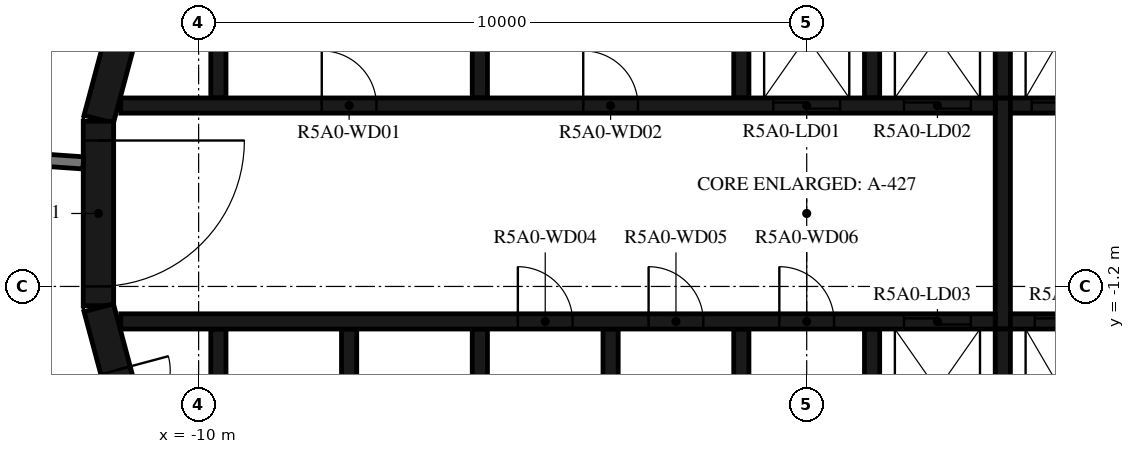
"""IFC4 building model, lengths in metres.
Left out: names, types, materials, properties, quantities, classifications, styles, units other than length and angle.
Written with IfcOpenShell. Run it as: python <this file> out.ifc"""

import sys

from ifc_helpers import new_model, si_unit, direction, frame, frame_2d, origin, place, context, subcontext, project, spatial, polyline, rectangle, outline, extrude, element, fill, save


model = new_model("IFC4")
c1 = context("Model", 3, precision=1e-05, world=origin(), true_north=direction((0.0, 1.0)))
c2 = subcontext(c1, "Body", "Model", "MODEL_VIEW")
j1 = project(units=[si_unit("LENGTHUNIT", "METRE"), si_unit("PLANEANGLEUNIT", "RADIAN")], contexts=[c1])
p1 = place(None, origin())
s1 = spatial("IfcSite", under=j1, at=p1, CompositionType="ELEMENT")
p2 = place(p1, origin())
s2 = spatial("IfcBuilding", under=s1, at=p2, CompositionType="ELEMENT")
p3 = place(p2, frame((0.0, 0.0, 195.4)))
s3 = spatial("IfcBuildingStorey", under=s2, at=p3, CompositionType="ELEMENT", Elevation=195.4)
p4 = place(p3, frame((-10.858, 4.479, 0.0), z_axis=(0.0, 0.0, 1.0), x_axis=(-0.258734743916, -0.965948410781, 0.0)))
e1 = element("IfcWall", 1, at=p4, inside=s3, PredefinedType="SHEAR", context=c2, shape_type="SweptSolid", body=[
    extrude(rectangle(XDim=3.033, YDim=0.5, at=frame_2d((1.516, 0.0))), origin(), (0.0, 0.0, 1.0), 3.12),
])
p5 = place(p3, frame((-11.647, 1.516, 0.0), z_axis=(0.0, 0.0, 1.0), x_axis=(0.0, -1.0, 0.0)))
e2 = element("IfcWall", 2, at=p5, inside=s3, PredefinedType="SHEAR", context=c2, shape_type="SweptSolid", body=[
    extrude(rectangle(XDim=3.033, YDim=0.5, at=frame_2d((1.516, 0.0))), origin(), (0.0, 0.0, 1.0), 3.12),
])
p6 = place(p5, frame((0.316, 0.0, 0.0)))
e3 = element("IfcOpeningElement", 3, at=p6, cuts=e2, PredefinedType="OPENING", context=c2, shape_type="SweptSolid", body=[
    extrude(rectangle(XDim=2.4, YDim=2.1, at=frame_2d((1.2, 1.05))), frame((0.0, 0.26, 0.0), z_axis=(0.0, -1.0, 0.0), x_axis=(1.0, 0.0, 0.0)), (0.0, 0.0, 1.0), 0.52),
])
p7 = place(p3, frame((-11.643, -1.55, 0.0), z_axis=(0.0, 0.0, 1.0), x_axis=(0.258734743916, -0.965948410781, 0.0)))
e4 = element("IfcWall", 4, at=p7, inside=s3, PredefinedType="SHEAR", context=c2, shape_type="SweptSolid", body=[
    extrude(rectangle(XDim=3.033, YDim=0.5, at=frame_2d((1.516, 0.0))), origin(), (0.0, 0.0, 1.0), 3.12),
])
p8 = place(p7, frame((1.066, 0.0, 0.0)))
e5 = element("IfcOpeningElement", 5, at=p8, cuts=e4, PredefinedType="OPENING", context=c2, shape_type="SweptSolid", body=[
    extrude(rectangle(XDim=0.9, YDim=2.1, at=frame_2d((0.45, 1.05))), frame((0.0, 0.26, 0.0), z_axis=(0.0, -1.0, 0.0), x_axis=(1.0, 0.0, 0.0)), (0.0, 0.0, 1.0), 0.52),
])
p9 = place(p3, origin())
e6 = element("IfcWall", 6, at=p9, inside=s3, PredefinedType="SHEAR", context=c2, shape_type="SweptSolid", body=[
    extrude(outline(polyline([(-9.55, 4.8), (-5.5, 4.8), (-5.5, 1.9), (-5.25, 1.9), (-5.25, 4.8), (-1.2, 4.8), (-1.2, 1.9), (-0.95, 1.9), (-0.95, 4.8), (0.95, 4.8), (0.95, 1.9), (1.2, 1.9), (1.2, 4.8), (3.1, 4.8), (3.1, 1.9), (3.35, 1.9), (3.35, 4.8), (5.25, 4.8), (5.25, 1.9), (5.5, 1.9), (5.5, 4.8), (7.4, 4.8), (7.4, 1.9), (7.65, 1.9), (7.65, 4.8), (9.55, 4.8), (9.55, 1.9), (9.8, 1.9), (9.8, 4.8), (9.8, 5.05), (-9.8, 5.05), (-9.8, 4.8), (-9.8, 1.9), (-9.55, 1.9), (-9.55, 4.8)])), origin(), (0.0, 0.0, 1.0), 3.12),
])
p10 = place(p3, origin())
e7 = element("IfcWall", 7, at=p10, inside=s3, PredefinedType="SHEAR", context=c2, shape_type="SweptSolid", body=[
    extrude(outline(polyline([(9.8, -5.05), (9.8, -4.8), (9.8, -1.9), (9.55, -1.9), (9.55, -4.8), (7.65, -4.8), (7.65, -1.9), (7.4, -1.9), (7.4, -4.8), (5.5, -4.8), (5.5, -1.9), (5.25, -1.9), (5.25, -4.8), (3.35, -4.8), (3.35, -1.9), (3.1, -1.9), (3.1, -4.8), (1.2, -4.8), (1.2, -1.9), (0.95, -1.9), (0.95, -4.8), (-0.95, -4.8), (-0.95, -1.9), (-1.2, -1.9), (-1.2, -4.8), (-3.1, -4.8), (-3.1, -1.9), (-3.35, -1.9), (-3.35, -4.8), (-5.25, -4.8), (-5.25, -1.9), (-5.5, -1.9), (-5.5, -4.8), (-7.4, -4.8), (-7.4, -1.9), (-7.65, -1.9), (-7.65, -4.8), (-9.55, -4.8), (-9.55, -1.9), (-9.8, -1.9), (-9.8, -4.8), (-9.8, -5.05), (9.8, -5.05)])), origin(), (0.0, 0.0, 1.0), 3.12),
])
p11 = place(p3, frame((-11.28, 1.775, 0.0), z_axis=(0.0, 0.0, 1.0), x_axis=(1.0, 0.0, 0.0)))
e8 = element("IfcWall", 8, at=p11, inside=s3, PredefinedType="SHEAR", context=c2, shape_type="SweptSolid", body=[
    extrude(rectangle(XDim=14.38, YDim=0.25, at=frame_2d((7.19, 0.0))), origin(), (0.0, 0.0, 1.0), 3.12),
])
p12 = place(p11, frame((10.73, 0.0, 0.0)))
e9 = element("IfcOpeningElement", 9, at=p12, cuts=e8, PredefinedType="OPENING", context=c2, shape_type="SweptSolid", body=[
    extrude(rectangle(XDim=1.1, YDim=2.1, at=frame_2d((0.55, 1.05))), frame((0.0, 0.135, 0.0), z_axis=(0.0, -1.0, 0.0), x_axis=(1.0, 0.0, 0.0)), (0.0, 0.0, 1.0), 0.27),
])
p13 = place(p11, frame((12.88, 0.0, 0.0)))
e10 = element("IfcOpeningElement", 10, at=p13, cuts=e8, PredefinedType="OPENING", context=c2, shape_type="SweptSolid", body=[
    extrude(rectangle(XDim=1.1, YDim=2.1, at=frame_2d((0.55, 1.05))), frame((0.0, 0.135, 0.0), z_axis=(0.0, -1.0, 0.0), x_axis=(1.0, 0.0, 0.0)), (0.0, 0.0, 1.0), 0.27),
])
p14 = place(p11, frame((3.305, 0.0, 0.0)))
e11 = element("IfcOpeningElement", 11, at=p14, cuts=e8, PredefinedType="OPENING", context=c2, shape_type="SweptSolid", body=[
    extrude(rectangle(XDim=0.9, YDim=2.1, at=frame_2d((0.45, 1.05))), frame((0.0, 0.135, 0.0), z_axis=(0.0, -1.0, 0.0), x_axis=(1.0, 0.0, 0.0)), (0.0, 0.0, 1.0), 0.27),
])
p15 = place(p11, frame((7.605, 0.0, 0.0)))
e12 = element("IfcOpeningElement", 12, at=p15, cuts=e8, PredefinedType="OPENING", context=c2, shape_type="SweptSolid", body=[
    extrude(rectangle(XDim=0.9, YDim=2.1, at=frame_2d((0.45, 1.05))), frame((0.0, 0.135, 0.0), z_axis=(0.0, -1.0, 0.0), x_axis=(1.0, 0.0, 0.0)), (0.0, 0.0, 1.0), 0.27),
])
p16 = place(p3, frame((3.35, 1.775, 0.0), z_axis=(0.0, 0.0, 1.0), x_axis=(1.0, 0.0, 0.0)))
e13 = element("IfcWall", 13, at=p16, inside=s3, PredefinedType="SHEAR", context=c2, shape_type="SweptSolid", body=[
    extrude(rectangle(XDim=7.93, YDim=0.25, at=frame_2d((3.965, 0.0))), origin(), (0.0, 0.0, 1.0), 3.12),
])
p17 = place(p16, frame((0.35, 0.0, 0.0)))
e14 = element("IfcOpeningElement", 14, at=p17, cuts=e13, PredefinedType="OPENING", context=c2, shape_type="SweptSolid", body=[
    extrude(rectangle(XDim=1.2, YDim=2.4, at=frame_2d((0.6, 1.2))), frame((0.0, 0.135, 0.0), z_axis=(0.0, -1.0, 0.0), x_axis=(1.0, 0.0, 0.0)), (0.0, 0.0, 1.0), 0.27),
])
p18 = place(p16, frame((2.5, 0.0, 0.0)))
e15 = element("IfcOpeningElement", 15, at=p18, cuts=e13, PredefinedType="OPENING", context=c2, shape_type="SweptSolid", body=[
    extrude(rectangle(XDim=1.2, YDim=2.4, at=frame_2d((0.6, 1.2))), frame((0.0, 0.135, 0.0), z_axis=(0.0, -1.0, 0.0), x_axis=(1.0, 0.0, 0.0)), (0.0, 0.0, 1.0), 0.27),
])
p19 = place(p16, frame((4.8, 0.0, 0.0)))
e16 = element("IfcOpeningElement", 16, at=p19, cuts=e13, PredefinedType="OPENING", context=c2, shape_type="SweptSolid", body=[
    extrude(rectangle(XDim=0.9, YDim=2.1, at=frame_2d((0.45, 1.05))), frame((0.0, 0.135, 0.0), z_axis=(0.0, -1.0, 0.0), x_axis=(1.0, 0.0, 0.0)), (0.0, 0.0, 1.0), 0.27),
])
p20 = place(p3, frame((-11.28, -1.775, 0.0), z_axis=(0.0, 0.0, 1.0), x_axis=(1.0, 0.0, 0.0)))
e17 = element("IfcWall", 17, at=p20, inside=s3, PredefinedType="SHEAR", context=c2, shape_type="SweptSolid", body=[
    extrude(rectangle(XDim=14.38, YDim=0.25, at=frame_2d((7.19, 0.0))), origin(), (0.0, 0.0, 1.0), 3.12),
])
p21 = place(p20, frame((12.88, 0.0, 0.0)))
e18 = element("IfcOpeningElement", 18, at=p21, cuts=e17, PredefinedType="OPENING", context=c2, shape_type="SweptSolid", body=[
    extrude(rectangle(XDim=1.1, YDim=2.1, at=frame_2d((0.55, 1.05))), frame((0.0, 0.135, 0.0), z_axis=(0.0, -1.0, 0.0), x_axis=(1.0, 0.0, 0.0)), (0.0, 0.0, 1.0), 0.27),
])
p22 = place(p20, frame((6.53, 0.0, 0.0)))
e19 = element("IfcOpeningElement", 19, at=p22, cuts=e17, PredefinedType="OPENING", context=c2, shape_type="SweptSolid", body=[
    extrude(rectangle(XDim=0.9, YDim=2.1, at=frame_2d((0.45, 1.05))), frame((0.0, 0.135, 0.0), z_axis=(0.0, -1.0, 0.0), x_axis=(1.0, 0.0, 0.0)), (0.0, 0.0, 1.0), 0.27),
])
p23 = place(p20, frame((8.68, 0.0, 0.0)))
e20 = element("IfcOpeningElement", 20, at=p23, cuts=e17, PredefinedType="OPENING", context=c2, shape_type="SweptSolid", body=[
    extrude(rectangle(XDim=0.9, YDim=2.1, at=frame_2d((0.45, 1.05))), frame((0.0, 0.135, 0.0), z_axis=(0.0, -1.0, 0.0), x_axis=(1.0, 0.0, 0.0)), (0.0, 0.0, 1.0), 0.27),
])
p24 = place(p20, frame((10.83, 0.0, 0.0)))
e21 = element("IfcOpeningElement", 21, at=p24, cuts=e17, PredefinedType="OPENING", context=c2, shape_type="SweptSolid", body=[
    extrude(rectangle(XDim=0.9, YDim=2.1, at=frame_2d((0.45, 1.05))), frame((0.0, 0.135, 0.0), z_axis=(0.0, -1.0, 0.0), x_axis=(1.0, 0.0, 0.0)), (0.0, 0.0, 1.0), 0.27),
])
p25 = place(p3, frame((3.35, -1.775, 0.0), z_axis=(0.0, 0.0, 1.0), x_axis=(1.0, 0.0, 0.0)))
e22 = element("IfcWall", 22, at=p25, inside=s3, PredefinedType="SHEAR", context=c2, shape_type="SweptSolid", body=[
    extrude(rectangle(XDim=7.93, YDim=0.25, at=frame_2d((3.965, 0.0))), origin(), (0.0, 0.0, 1.0), 3.12),
])
p26 = place(p25, frame((0.4, 0.0, 0.0)))
e23 = element("IfcOpeningElement", 23, at=p26, cuts=e22, PredefinedType="OPENING", context=c2, shape_type="SweptSolid", body=[
    extrude(rectangle(XDim=1.1, YDim=2.4, at=frame_2d((0.55, 1.2))), frame((0.0, 0.135, 0.0), z_axis=(0.0, -1.0, 0.0), x_axis=(1.0, 0.0, 0.0)), (0.0, 0.0, 1.0), 0.27),
])
p27 = place(p25, frame((2.55, 0.0, 0.0)))
e24 = element("IfcOpeningElement", 24, at=p27, cuts=e22, PredefinedType="OPENING", context=c2, shape_type="SweptSolid", body=[
    extrude(rectangle(XDim=1.1, YDim=2.4, at=frame_2d((0.55, 1.2))), frame((0.0, 0.135, 0.0), z_axis=(0.0, -1.0, 0.0), x_axis=(1.0, 0.0, 0.0)), (0.0, 0.0, 1.0), 0.27),
])
p28 = place(p25, frame((4.7, 0.0, 0.0)))
e25 = element("IfcOpeningElement", 25, at=p28, cuts=e22, PredefinedType="OPENING", context=c2, shape_type="SweptSolid", body=[
    extrude(rectangle(XDim=1.1, YDim=2.4, at=frame_2d((0.55, 1.2))), frame((0.0, 0.135, 0.0), z_axis=(0.0, -1.0, 0.0), x_axis=(1.0, 0.0, 0.0)), (0.0, 0.0, 1.0), 0.27),
])
p29 = place(p3, frame((3.225, -1.9, 0.0), z_axis=(0.0, 0.0, 1.0), x_axis=(0.0, 1.0, 0.0)))
e26 = element("IfcWall", 26, at=p29, inside=s3, PredefinedType="SHEAR", context=c2, shape_type="SweptSolid", body=[
    extrude(rectangle(XDim=3.8, YDim=0.25, at=frame_2d((1.9, 0.0))), origin(), (0.0, 0.0, 1.0), 3.12),
])
p30 = place(p3, frame((-13.367, 0.935, 0.0), z_axis=(0.0, 0.0, 1.0), x_axis=(0.997553656289, -0.069904955655, 0.0)))
e27 = element("IfcWall", 27, at=p30, inside=s3, PredefinedType="STANDARD", context=c2, shape_type="SweptSolid", body=[
    extrude(rectangle(XDim=1.474, YDim=0.2, at=frame_2d((0.737, 0.0))), origin(), (0.0, 0.0, 1.0), 3.12),
])
p31 = place(p6, origin())
e28 = element("IfcDoor", 28, at=p31, inside=s3, OperationType="DOUBLE_DOOR_SINGLE_SWING", PredefinedType="DOOR", context=c2, shape_type="SweptSolid", body=[
    extrude(rectangle(XDim=2.4, YDim=2.1, at=frame_2d((1.2, 1.05))), frame((0.0, 0.025, 0.0), z_axis=(0.0, -1.0, 0.0), x_axis=(1.0, 0.0, 0.0)), (0.0, 0.0, 1.0), 0.05),
])
fill(e3, e28)
p32 = place(p12, origin())
e29 = element("IfcDoor", 29, at=p32, inside=s3, OperationType="DOUBLE_DOOR_SLIDING", PredefinedType="DOOR", context=c2, shape_type="SweptSolid", body=[
    extrude(rectangle(XDim=1.1, YDim=2.1, at=frame_2d((0.55, 1.05))), frame((0.0, 0.025, 0.0), z_axis=(0.0, -1.0, 0.0), x_axis=(1.0, 0.0, 0.0)), (0.0, 0.0, 1.0), 0.05),
])
fill(e9, e29)
p33 = place(p13, origin())
e30 = element("IfcDoor", 30, at=p33, inside=s3, OperationType="DOUBLE_DOOR_SLIDING", PredefinedType="DOOR", context=c2, shape_type="SweptSolid", body=[
    extrude(rectangle(XDim=1.1, YDim=2.1, at=frame_2d((0.55, 1.05))), frame((0.0, 0.025, 0.0), z_axis=(0.0, -1.0, 0.0), x_axis=(1.0, 0.0, 0.0)), (0.0, 0.0, 1.0), 0.05),
])
fill(e10, e30)
p34 = place(p17, origin())
e31 = element("IfcDoor", 31, at=p34, inside=s3, OperationType="DOUBLE_DOOR_SLIDING", PredefinedType="DOOR", context=c2, shape_type="SweptSolid", body=[
    extrude(rectangle(XDim=1.2, YDim=2.4, at=frame_2d((0.6, 1.2))), frame((0.0, 0.025, 0.0), z_axis=(0.0, -1.0, 0.0), x_axis=(1.0, 0.0, 0.0)), (0.0, 0.0, 1.0), 0.05),
])
fill(e14, e31)
p35 = place(p21, origin())
e32 = element("IfcDoor", 32, at=p35, inside=s3, OperationType="DOUBLE_DOOR_SLIDING", PredefinedType="DOOR", context=c2, shape_type="SweptSolid", body=[
    extrude(rectangle(XDim=1.1, YDim=2.1, at=frame_2d((0.55, 1.05))), frame((0.0, 0.025, 0.0), z_axis=(0.0, -1.0, 0.0), x_axis=(1.0, 0.0, 0.0)), (0.0, 0.0, 1.0), 0.05),
])
fill(e18, e32)
p36 = place(p26, origin())
e33 = element("IfcDoor", 33, at=p36, inside=s3, OperationType="DOUBLE_DOOR_SLIDING", PredefinedType="DOOR", context=c2, shape_type="SweptSolid", body=[
    extrude(rectangle(XDim=1.1, YDim=2.4, at=frame_2d((0.55, 1.2))), frame((0.0, 0.025, 0.0), z_axis=(0.0, -1.0, 0.0), x_axis=(1.0, 0.0, 0.0)), (0.0, 0.0, 1.0), 0.05),
])
fill(e23, e33)
p37 = place(p14, origin())
e34 = element("IfcDoor", 34, at=p37, inside=s3, OperationType="SINGLE_SWING_LEFT", PredefinedType="DOOR", context=c2, shape_type="SweptSolid", body=[
    extrude(rectangle(XDim=0.9, YDim=2.1, at=frame_2d((0.45, 1.05))), frame((0.0, 0.025, 0.0), z_axis=(0.0, -1.0, 0.0), x_axis=(1.0, 0.0, 0.0)), (0.0, 0.0, 1.0), 0.05),
])
fill(e11, e34)
p38 = place(p15, origin())
e35 = element("IfcDoor", 35, at=p38, inside=s3, OperationType="SINGLE_SWING_RIGHT", PredefinedType="DOOR", context=c2, shape_type="SweptSolid", body=[
    extrude(rectangle(XDim=0.9, YDim=2.1, at=frame_2d((0.45, 1.05))), frame((0.0, 0.025, 0.0), z_axis=(0.0, -1.0, 0.0), x_axis=(1.0, 0.0, 0.0)), (0.0, 0.0, 1.0), 0.05),
])
fill(e12, e35)
p39 = place(p22, origin())
e36 = element("IfcDoor", 36, at=p39, inside=s3, OperationType="SINGLE_SWING_RIGHT", PredefinedType="DOOR", context=c2, shape_type="SweptSolid", body=[
    extrude(rectangle(XDim=0.9, YDim=2.1, at=frame_2d((0.45, 1.05))), frame((0.0, 0.025, 0.0), z_axis=(0.0, -1.0, 0.0), x_axis=(1.0, 0.0, 0.0)), (0.0, 0.0, 1.0), 0.05),
])
fill(e19, e36)
p40 = place(p23, origin())
e37 = element("IfcDoor", 37, at=p40, inside=s3, OperationType="SINGLE_SWING_LEFT", PredefinedType="DOOR", context=c2, shape_type="SweptSolid", body=[
    extrude(rectangle(XDim=0.9, YDim=2.1, at=frame_2d((0.45, 1.05))), frame((0.0, 0.025, 0.0), z_axis=(0.0, -1.0, 0.0), x_axis=(1.0, 0.0, 0.0)), (0.0, 0.0, 1.0), 0.05),
])
fill(e20, e37)
p41 = place(p24, origin())
e38 = element("IfcDoor", 38, at=p41, inside=s3, OperationType="SINGLE_SWING_RIGHT", PredefinedType="DOOR", context=c2, shape_type="SweptSolid", body=[
    extrude(rectangle(XDim=0.9, YDim=2.1, at=frame_2d((0.45, 1.05))), frame((0.0, 0.025, 0.0), z_axis=(0.0, -1.0, 0.0), x_axis=(1.0, 0.0, 0.0)), (0.0, 0.0, 1.0), 0.05),
])
fill(e21, e38)
p42 = place(p8, origin())
e39 = element("IfcDoor", 39, at=p42, inside=s3, OperationType="SINGLE_SWING_LEFT", PredefinedType="DOOR", context=c2, shape_type="SweptSolid", body=[
    extrude(rectangle(XDim=0.9, YDim=2.1, at=frame_2d((0.45, 1.05))), frame((0.0, 0.025, 0.0), z_axis=(0.0, -1.0, 0.0), x_axis=(1.0, 0.0, 0.0)), (0.0, 0.0, 1.0), 0.05),
])
fill(e5, e39)
save(model, sys.argv[1])
